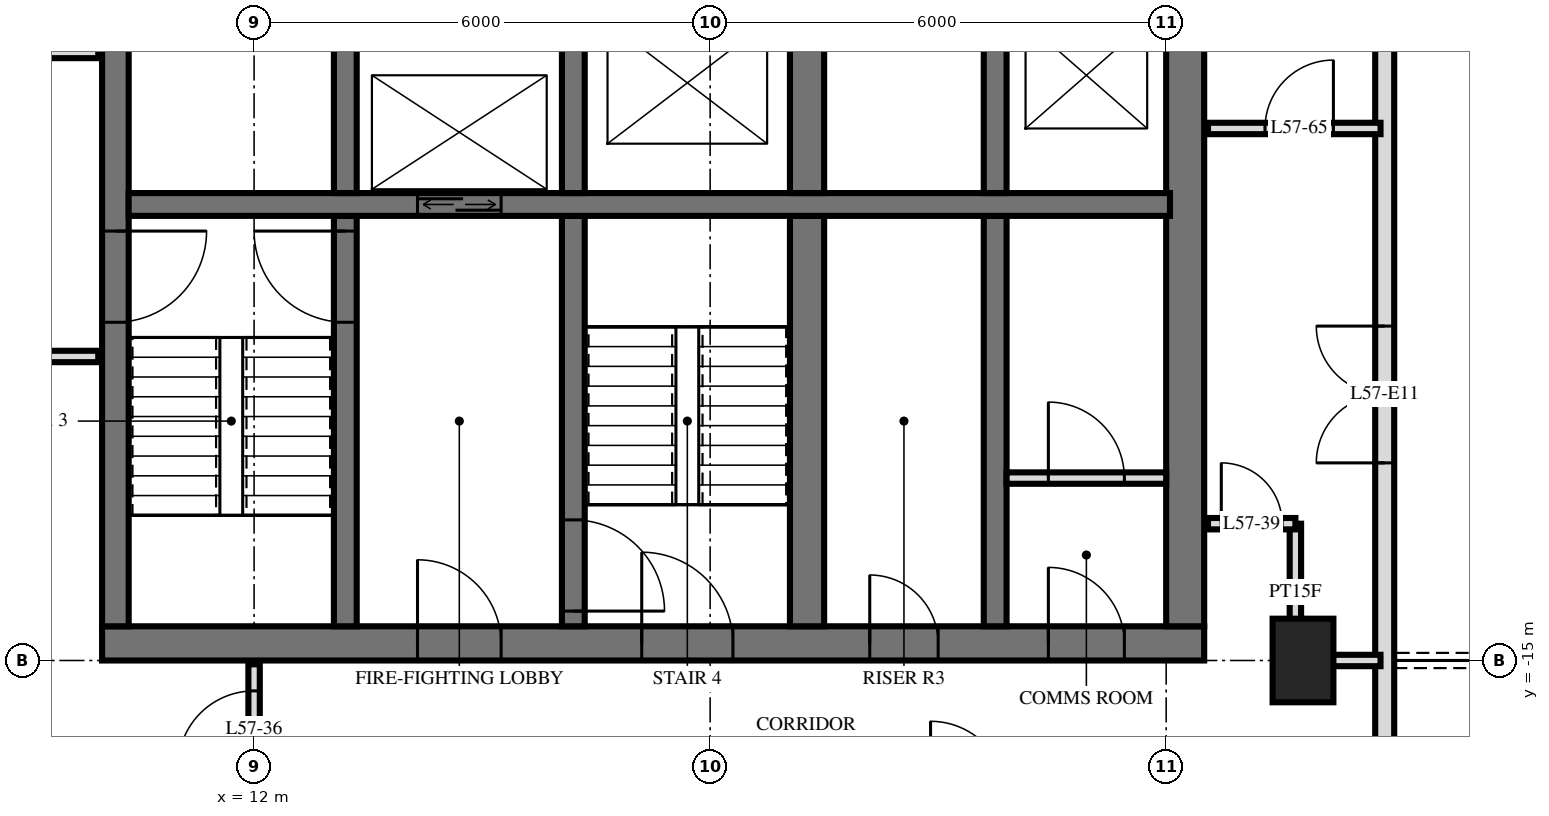
"""IFC4 building model, lengths in metres.
Left out: names, types, materials, properties, quantities, classifications, styles, units other than length and angle.
Written with IfcOpenShell. Run it as: python <this file> out.ifc"""

import sys

from ifc_helpers import new_model, si_unit, direction, frame, frame_2d, origin, origin_2d, place, context, subcontext, project, spatial, rectangle, extrude, element, fill, save


model = new_model("IFC4")
c1 = context("Model", 3, precision=1e-05, world=origin(), true_north=direction((0.0, 1.0)))
c2 = subcontext(c1, "Body", "Model", "MODEL_VIEW")
j1 = project(units=[si_unit("LENGTHUNIT", "METRE"), si_unit("PLANEANGLEUNIT", "RADIAN")], contexts=[c1])
p1 = place(None, origin())
s1 = spatial("IfcSite", under=j1, at=p1, CompositionType="ELEMENT")
p2 = place(p1, origin())
s2 = spatial("IfcBuilding", under=s1, at=p2, CompositionType="ELEMENT")
p3 = place(p2, frame((0.0, 0.0, 218.6)))
s3 = spatial("IfcBuildingStorey", under=s2, at=p3, CompositionType="ELEMENT", Elevation=218.6)
p4 = place(p3, frame((25.8, -15.0, 0.0), z_axis=(0.0, 0.0, 1.0), x_axis=(0.0, 1.0, 0.0)))
e1 = element("IfcColumn", 1, at=p4, inside=s3, PredefinedType="COLUMN", context=c2, shape_type="SweptSolid", body=[
    extrude(rectangle(XDim=1.1, YDim=0.8, at=origin_2d()), origin(), (0.0, 0.0, 1.0), 3.5),
])
p5 = place(p3, frame((10.0, -14.775, 0.0), z_axis=(0.0, 0.0, 1.0), x_axis=(1.0, 0.0, 0.0)))
e2 = element("IfcWall", 2, at=p5, inside=s3, PredefinedType="SHEAR", context=c2, shape_type="SweptSolid", body=[
    extrude(rectangle(XDim=14.5, YDim=0.45, at=frame_2d((7.25, 0.0))), origin(), (0.0, 0.0, 1.0), 3.5),
])
p6 = place(p5, frame((7.1, 0.0, 0.0)))
e3 = element("IfcOpeningElement", 3, at=p6, cuts=e2, PredefinedType="OPENING", context=c2, shape_type="SweptSolid", body=[
    extrude(rectangle(XDim=1.2, YDim=2.1, at=frame_2d((0.6, 1.05))), frame((0.0, 0.235, 0.0), z_axis=(0.0, -1.0, 0.0), x_axis=(1.0, 0.0, 0.0)), (0.0, 0.0, 1.0), 0.47),
])
p7 = place(p5, frame((4.15, 0.0, 0.0)))
e4 = element("IfcOpeningElement", 4, at=p7, cuts=e2, PredefinedType="OPENING", context=c2, shape_type="SweptSolid", body=[
    extrude(rectangle(XDim=1.1, YDim=2.1, at=frame_2d((0.55, 1.05))), frame((0.0, 0.235, 0.0), z_axis=(0.0, -1.0, 0.0), x_axis=(1.0, 0.0, 0.0)), (0.0, 0.0, 1.0), 0.47),
])
p8 = place(p5, frame((10.1, 0.0, 0.0)))
e5 = element("IfcOpeningElement", 5, at=p8, cuts=e2, PredefinedType="OPENING", context=c2, shape_type="SweptSolid", body=[
    extrude(rectangle(XDim=0.9, YDim=2.1, at=frame_2d((0.45, 1.05))), frame((0.0, 0.235, 0.0), z_axis=(0.0, -1.0, 0.0), x_axis=(1.0, 0.0, 0.0)), (0.0, 0.0, 1.0), 0.47),
])
p9 = place(p5, frame((12.45, 0.0, 0.0)))
e6 = element("IfcOpeningElement", 6, at=p9, cuts=e2, PredefinedType="OPENING", context=c2, shape_type="SweptSolid", body=[
    extrude(rectangle(XDim=1.0, YDim=2.1, at=frame_2d((0.5, 1.05))), frame((0.0, 0.235, 0.0), z_axis=(0.0, -1.0, 0.0), x_axis=(1.0, 0.0, 0.0)), (0.0, 0.0, 1.0), 0.47),
])
p10 = place(p3, frame((10.175, -14.55, 0.0), z_axis=(0.0, 0.0, 1.0), x_axis=(0.0, 1.0, 0.0)))
e7 = element("IfcWall", 7, at=p10, inside=s3, PredefinedType="SHEAR", context=c2, shape_type="SweptSolid", body=[
    extrude(rectangle(XDim=14.1, YDim=0.35, at=frame_2d((7.05, 0.0))), origin(), (0.0, 0.0, 1.0), 3.5),
])
p11 = place(p10, frame((8.4, 0.0, 0.0)))
e8 = element("IfcOpeningElement", 8, at=p11, cuts=e7, PredefinedType="OPENING", context=c2, shape_type="SweptSolid", body=[
    extrude(rectangle(XDim=1.4, YDim=2.4, at=frame_2d((0.7, 1.2))), frame((0.0, 0.185, 0.0), z_axis=(0.0, -1.0, 0.0), x_axis=(1.0, 0.0, 0.0)), (0.0, 0.0, 1.0), 0.37),
])
p12 = place(p10, frame((10.0, 0.0, 0.0)))
e9 = element("IfcOpeningElement", 9, at=p12, cuts=e7, PredefinedType="OPENING", context=c2, shape_type="SweptSolid", body=[
    extrude(rectangle(XDim=1.4, YDim=2.4, at=frame_2d((0.7, 1.2))), frame((0.0, 0.185, 0.0), z_axis=(0.0, -1.0, 0.0), x_axis=(1.0, 0.0, 0.0)), (0.0, 0.0, 1.0), 0.37),
])
p13 = place(p10, frame((4.0, 0.0, 0.0)))
e10 = element("IfcOpeningElement", 10, at=p13, cuts=e7, PredefinedType="OPENING", context=c2, shape_type="SweptSolid", body=[
    extrude(rectangle(XDim=1.2, YDim=2.1, at=frame_2d((0.6, 1.05))), frame((0.0, 0.185, 0.0), z_axis=(0.0, -1.0, 0.0), x_axis=(1.0, 0.0, 0.0)), (0.0, 0.0, 1.0), 0.37),
])
p14 = place(p3, frame((24.25, -14.55, 0.0), z_axis=(0.0, 0.0, 1.0), x_axis=(0.0, 1.0, 0.0)))
e11 = element("IfcWall", 11, at=p14, inside=s3, PredefinedType="SHEAR", context=c2, shape_type="SweptSolid", body=[
    extrude(rectangle(XDim=14.1, YDim=0.5, at=frame_2d((7.05, 0.0))), origin(), (0.0, 0.0, 1.0), 3.5),
])
p15 = place(p3, frame((10.35, -9.0, 0.0), z_axis=(0.0, 0.0, 1.0), x_axis=(1.0, 0.0, 0.0)))
e12 = element("IfcWall", 12, at=p15, inside=s3, PredefinedType="SHEAR", context=c2, shape_type="SweptSolid", body=[
    extrude(rectangle(XDim=13.7, YDim=0.3, at=frame_2d((6.85, 0.0))), origin(), (0.0, 0.0, 1.0), 3.5),
])
p16 = place(p15, frame((3.8, 0.0, 0.0)))
e13 = element("IfcOpeningElement", 13, at=p16, cuts=e12, PredefinedType="OPENING", context=c2, shape_type="SweptSolid", body=[
    extrude(rectangle(XDim=1.1, YDim=2.1, at=frame_2d((0.55, 1.05))), frame((0.0, 0.16, 0.0), z_axis=(0.0, -1.0, 0.0), x_axis=(1.0, 0.0, 0.0)), (0.0, 0.0, 1.0), 0.32),
])
p17 = place(p3, frame((13.2, -8.85, 0.0), z_axis=(0.0, 0.0, 1.0), x_axis=(0.0, 1.0, 0.0)))
e14 = element("IfcWall", 14, at=p17, inside=s3, PredefinedType="SHEAR", context=c2, shape_type="SweptSolid", body=[
    extrude(rectangle(XDim=2.3, YDim=0.3, at=frame_2d((1.15, 0.0))), origin(), (0.0, 0.0, 1.0), 3.5),
])
p18 = place(p3, frame((13.2, -14.55, 0.0), z_axis=(0.0, 0.0, 1.0), x_axis=(0.0, 1.0, 0.0)))
e15 = element("IfcWall", 15, at=p18, inside=s3, PredefinedType="SHEAR", context=c2, shape_type="SweptSolid", body=[
    extrude(rectangle(XDim=5.4, YDim=0.3, at=frame_2d((2.7, 0.0))), origin(), (0.0, 0.0, 1.0), 3.5),
])
p19 = place(p18, frame((4.0, 0.0, 0.0)))
e16 = element("IfcOpeningElement", 16, at=p19, cuts=e15, PredefinedType="OPENING", context=c2, shape_type="SweptSolid", body=[
    extrude(rectangle(XDim=1.2, YDim=2.1, at=frame_2d((0.6, 1.05))), frame((0.0, 0.16, 0.0), z_axis=(0.0, -1.0, 0.0), x_axis=(1.0, 0.0, 0.0)), (0.0, 0.0, 1.0), 0.32),
])
p20 = place(p3, frame((16.2, -8.85, 0.0), z_axis=(0.0, 0.0, 1.0), x_axis=(0.0, 1.0, 0.0)))
e17 = element("IfcWall", 17, at=p20, inside=s3, PredefinedType="SHEAR", context=c2, shape_type="SweptSolid", body=[
    extrude(rectangle(XDim=2.3, YDim=0.3, at=frame_2d((1.15, 0.0))), origin(), (0.0, 0.0, 1.0), 3.5),
])
p21 = place(p3, frame((16.2, -14.55, 0.0), z_axis=(0.0, 0.0, 1.0), x_axis=(0.0, 1.0, 0.0)))
e18 = element("IfcWall", 18, at=p21, inside=s3, PredefinedType="SHEAR", context=c2, shape_type="SweptSolid", body=[
    extrude(rectangle(XDim=5.4, YDim=0.3, at=frame_2d((2.7, 0.0))), origin(), (0.0, 0.0, 1.0), 3.5),
])
p22 = place(p21, frame((0.2, 0.0, 0.0)))
e19 = element("IfcOpeningElement", 19, at=p22, cuts=e18, PredefinedType="OPENING", context=c2, shape_type="SweptSolid", body=[
    extrude(rectangle(XDim=1.2, YDim=2.1, at=frame_2d((0.6, 1.05))), frame((0.0, 0.16, 0.0), z_axis=(0.0, -1.0, 0.0), x_axis=(1.0, 0.0, 0.0)), (0.0, 0.0, 1.0), 0.32),
])
p23 = place(p3, frame((19.275, -8.85, 0.0), z_axis=(0.0, 0.0, 1.0), x_axis=(0.0, 1.0, 0.0)))
e20 = element("IfcWall", 20, at=p23, inside=s3, PredefinedType="SHEAR", context=c2, shape_type="SweptSolid", body=[
    extrude(rectangle(XDim=2.3, YDim=0.45, at=frame_2d((1.15, 0.0))), origin(), (0.0, 0.0, 1.0), 3.5),
])
p24 = place(p3, frame((19.275, -14.55, 0.0), z_axis=(0.0, 0.0, 1.0), x_axis=(0.0, 1.0, 0.0)))
e21 = element("IfcWall", 21, at=p24, inside=s3, PredefinedType="SHEAR", context=c2, shape_type="SweptSolid", body=[
    extrude(rectangle(XDim=5.4, YDim=0.45, at=frame_2d((2.7, 0.0))), origin(), (0.0, 0.0, 1.0), 3.5),
])
p25 = place(p3, frame((21.75, -8.85, 0.0), z_axis=(0.0, 0.0, 1.0), x_axis=(0.0, 1.0, 0.0)))
e22 = element("IfcWall", 22, at=p25, inside=s3, PredefinedType="SHEAR", context=c2, shape_type="SweptSolid", body=[
    extrude(rectangle(XDim=2.3, YDim=0.3, at=frame_2d((1.15, 0.0))), origin(), (0.0, 0.0, 1.0), 3.5),
])
p26 = place(p3, frame((21.75, -14.55, 0.0), z_axis=(0.0, 0.0, 1.0), x_axis=(0.0, 1.0, 0.0)))
e23 = element("IfcWall", 23, at=p26, inside=s3, PredefinedType="SHEAR", context=c2, shape_type="SweptSolid", body=[
    extrude(rectangle(XDim=5.4, YDim=0.3, at=frame_2d((2.7, 0.0))), origin(), (0.0, 0.0, 1.0), 3.5),
])
p27 = place(p3, frame((26.875, -24.875, 0.0), z_axis=(0.0, 0.0, 1.0), x_axis=(0.0, 1.0, 0.0)))
e24 = element("IfcWall", 24, at=p27, inside=s3, PredefinedType="SOLIDWALL", context=c2, shape_type="SweptSolid", body=[
    extrude(rectangle(XDim=21.551, YDim=0.25, at=frame_2d((10.775, 0.0))), origin(), (0.0, 0.0, 1.0), 3.22),
])
p28 = place(p27, frame((0.575, 0.0, 0.0)))
e25 = element("IfcOpeningElement", 25, at=p28, cuts=e24, PredefinedType="OPENING", context=c2, shape_type="SweptSolid", body=[
    extrude(rectangle(XDim=1.8, YDim=2.4, at=frame_2d((0.9, 1.2))), frame((0.0, 0.135, 0.0), z_axis=(0.0, -1.0, 0.0), x_axis=(1.0, 0.0, 0.0)), (0.0, 0.0, 1.0), 0.27),
])
p29 = place(p27, frame((5.075, 0.0, 0.0)))
e26 = element("IfcOpeningElement", 26, at=p29, cuts=e24, PredefinedType="OPENING", context=c2, shape_type="SweptSolid", body=[
    extrude(rectangle(XDim=1.8, YDim=2.4, at=frame_2d((0.9, 1.2))), frame((0.0, 0.135, 0.0), z_axis=(0.0, -1.0, 0.0), x_axis=(1.0, 0.0, 0.0)), (0.0, 0.0, 1.0), 0.27),
])
p30 = place(p27, frame((12.475, 0.0, 0.0)))
e27 = element("IfcOpeningElement", 27, at=p30, cuts=e24, PredefinedType="OPENING", context=c2, shape_type="SweptSolid", body=[
    extrude(rectangle(XDim=1.8, YDim=2.4, at=frame_2d((0.9, 1.2))), frame((0.0, 0.135, 0.0), z_axis=(0.0, -1.0, 0.0), x_axis=(1.0, 0.0, 0.0)), (0.0, 0.0, 1.0), 0.27),
])
p31 = place(p3, frame((21.9, -12.6, 0.0), z_axis=(0.0, 0.0, 1.0), x_axis=(1.0, 0.0, 0.0)))
e28 = element("IfcWall", 28, at=p31, inside=s3, PredefinedType="PARTITIONING", context=c2, shape_type="SweptSolid", body=[
    extrude(rectangle(XDim=2.1, YDim=0.15, at=frame_2d((1.05, 0.0))), origin(), (0.0, 0.0, 1.0), 3.2),
])
p32 = place(p31, frame((0.55, 0.0, 0.0)))
e29 = element("IfcOpeningElement", 29, at=p32, cuts=e28, PredefinedType="OPENING", context=c2, shape_type="SweptSolid", body=[
    extrude(rectangle(XDim=1.0, YDim=2.1, at=frame_2d((0.5, 1.05))), frame((0.0, 0.085, 0.0), z_axis=(0.0, -1.0, 0.0), x_axis=(1.0, 0.0, 0.0)), (0.0, 0.0, 1.0), 0.17),
])
p33 = place(p3, frame((25.7, -15.0, 0.0), z_axis=(0.0, 0.0, 1.0), x_axis=(0.0, 1.0, 0.0)))
e30 = element("IfcWall", 30, at=p33, inside=s3, PredefinedType="PARTITIONING", context=c2, shape_type="SweptSolid", body=[
    extrude(rectangle(XDim=1.8, YDim=0.15, at=frame_2d((0.9, 0.0))), origin(), (0.0, 0.0, 1.0), 3.22),
])
p34 = place(p3, frame((12.0, -16.8, 0.0), z_axis=(0.0, 0.0, 1.0), x_axis=(0.0, 1.0, 0.0)))
e31 = element("IfcWall", 31, at=p34, inside=s3, PredefinedType="PARTITIONING", context=c2, shape_type="SweptSolid", body=[
    extrude(rectangle(XDim=1.75, YDim=0.15, at=frame_2d((0.875, 0.0))), origin(), (0.0, 0.0, 1.0), 3.22),
])
p35 = place(p34, frame((0.4, 0.0, 0.0)))
e32 = element("IfcOpeningElement", 32, at=p35, cuts=e31, PredefinedType="OPENING", context=c2, shape_type="SweptSolid", body=[
    extrude(rectangle(XDim=1.0, YDim=2.1, at=frame_2d((0.5, 1.05))), frame((0.0, 0.085, 0.0), z_axis=(0.0, -1.0, 0.0), x_axis=(1.0, 0.0, 0.0)), (0.0, 0.0, 1.0), 0.17),
])
p36 = place(p3, frame((25.7, -15.0, 0.0), z_axis=(0.0, 0.0, 1.0), x_axis=(1.0, 0.0, 0.0)))
e33 = element("IfcWall", 33, at=p36, inside=s3, PredefinedType="PARTITIONING", context=c2, shape_type="SweptSolid", body=[
    extrude(rectangle(XDim=1.12, YDim=0.15, at=frame_2d((0.56, 0.0))), origin(), (0.0, 0.0, 1.0), 3.22),
])
p37 = place(p3, frame((24.55, -13.2, 0.0), z_axis=(0.0, 0.0, 1.0), x_axis=(1.0, 0.0, 0.0)))
e34 = element("IfcWall", 34, at=p37, inside=s3, PredefinedType="PARTITIONING", context=c2, shape_type="SweptSolid", body=[
    extrude(rectangle(XDim=1.15, YDim=0.15, at=frame_2d((0.575, 0.0))), origin(), (0.0, 0.0, 1.0), 3.22),
])
p38 = place(p37, frame((0.175, 0.0, 0.0)))
e35 = element("IfcOpeningElement", 35, at=p38, cuts=e34, PredefinedType="OPENING", context=c2, shape_type="SweptSolid", body=[
    extrude(rectangle(XDim=0.8, YDim=2.1, at=frame_2d((0.4, 1.05))), frame((0.0, 0.085, 0.0), z_axis=(0.0, -1.0, 0.0), x_axis=(1.0, 0.0, 0.0)), (0.0, 0.0, 1.0), 0.17),
])
p39 = place(p3, frame((-9.95, -11.0, 0.0), z_axis=(0.0, 0.0, 1.0), x_axis=(1.0, 0.0, 0.0)))
e36 = element("IfcWall", 36, at=p39, inside=s3, PredefinedType="PARTITIONING", context=c2, shape_type="SweptSolid", body=[
    extrude(rectangle(XDim=19.9, YDim=0.15, at=frame_2d((9.95, 0.0))), origin(), (0.0, 0.0, 1.0), 3.22),
])
p40 = place(p39, frame((9.45, 0.0, 0.0)))
e37 = element("IfcOpeningElement", 37, at=p40, cuts=e36, PredefinedType="OPENING", context=c2, shape_type="SweptSolid", body=[
    extrude(rectangle(XDim=1.0, YDim=2.1, at=frame_2d((0.5, 1.05))), frame((0.0, 0.085, 0.0), z_axis=(0.0, -1.0, 0.0), x_axis=(1.0, 0.0, 0.0)), (0.0, 0.0, 1.0), 0.17),
])
p41 = place(p39, frame((3.45, 0.0, 0.0)))
e38 = element("IfcOpeningElement", 38, at=p41, cuts=e36, PredefinedType="OPENING", context=c2, shape_type="SweptSolid", body=[
    extrude(rectangle(XDim=1.0, YDim=2.1, at=frame_2d((0.5, 1.05))), frame((0.0, 0.085, 0.0), z_axis=(0.0, -1.0, 0.0), x_axis=(1.0, 0.0, 0.0)), (0.0, 0.0, 1.0), 0.17),
])
p42 = place(p3, frame((24.55, -8.0, 0.0), z_axis=(0.0, 0.0, 1.0), x_axis=(1.0, 0.0, 0.0)))
e39 = element("IfcWall", 39, at=p42, inside=s3, PredefinedType="PARTITIONING", context=c2, shape_type="SweptSolid", body=[
    extrude(rectangle(XDim=2.27, YDim=0.15, at=frame_2d((1.135, 0.0))), origin(), (0.0, 0.0, 1.0), 3.22),
])
p43 = place(p42, frame((0.75, 0.0, 0.0)))
e40 = element("IfcOpeningElement", 40, at=p43, cuts=e39, PredefinedType="OPENING", context=c2, shape_type="SweptSolid", body=[
    extrude(rectangle(XDim=0.9, YDim=2.1, at=frame_2d((0.45, 1.05))), frame((0.0, 0.085, 0.0), z_axis=(0.0, -1.0, 0.0), x_axis=(1.0, 0.0, 0.0)), (0.0, 0.0, 1.0), 0.17),
])
p44 = place(p3, frame((-9.95, -7.0, 0.0), z_axis=(0.0, 0.0, 1.0), x_axis=(1.0, 0.0, 0.0)))
e41 = element("IfcWall", 41, at=p44, inside=s3, PredefinedType="PARTITIONING", context=c2, shape_type="SweptSolid", body=[
    extrude(rectangle(XDim=19.9, YDim=0.15, at=frame_2d((9.95, 0.0))), origin(), (0.0, 0.0, 1.0), 3.22),
])
p45 = place(p44, frame((9.45, 0.0, 0.0)))
e42 = element("IfcOpeningElement", 42, at=p45, cuts=e41, PredefinedType="OPENING", context=c2, shape_type="SweptSolid", body=[
    extrude(rectangle(XDim=1.0, YDim=2.1, at=frame_2d((0.5, 1.05))), frame((0.0, 0.085, 0.0), z_axis=(0.0, -1.0, 0.0), x_axis=(1.0, 0.0, 0.0)), (0.0, 0.0, 1.0), 0.17),
])
p46 = place(p44, frame((15.45, 0.0, 0.0)))
e43 = element("IfcOpeningElement", 43, at=p46, cuts=e41, PredefinedType="OPENING", context=c2, shape_type="SweptSolid", body=[
    extrude(rectangle(XDim=1.0, YDim=2.1, at=frame_2d((0.5, 1.05))), frame((0.0, 0.085, 0.0), z_axis=(0.0, -1.0, 0.0), x_axis=(1.0, 0.0, 0.0)), (0.0, 0.0, 1.0), 0.17),
])
p47 = place(p30, origin())
e44 = element("IfcDoor", 44, at=p47, inside=s3, OperationType="DOUBLE_DOOR_SINGLE_SWING", PredefinedType="DOOR", context=c2, shape_type="SweptSolid", body=[
    extrude(rectangle(XDim=1.8, YDim=2.4, at=frame_2d((0.9, 1.2))), frame((0.0, 0.025, 0.0), z_axis=(0.0, -1.0, 0.0), x_axis=(1.0, 0.0, 0.0)), (0.0, 0.0, 1.0), 0.05),
])
fill(e27, e44)
p48 = place(p16, origin())
e45 = element("IfcDoor", 45, at=p48, inside=s3, OperationType="DOUBLE_DOOR_SLIDING", PredefinedType="USERDEFINED", context=c2, shape_type="SweptSolid", body=[
    extrude(rectangle(XDim=1.1, YDim=2.1, at=frame_2d((0.55, 1.05))), frame((0.0, 0.025, 0.0), z_axis=(0.0, -1.0, 0.0), x_axis=(1.0, 0.0, 0.0)), (0.0, 0.0, 1.0), 0.05),
])
fill(e13, e45)
p49 = place(p13, frame((0.6, 0.0, 0.0), z_axis=(0.0, 0.0, 1.0), x_axis=(-1.0, 0.0, 0.0)))
e46 = element("IfcDoor", 46, at=p49, inside=s3, OperationType="SINGLE_SWING_RIGHT", PredefinedType="DOOR", context=c2, shape_type="SweptSolid", body=[
    extrude(rectangle(XDim=1.2, YDim=2.1, at=frame_2d((0.0, 1.05))), frame((0.0, -0.025, 0.0), z_axis=(0.0, 1.0, 0.0), x_axis=(-1.0, 0.0, 0.0)), (0.0, 0.0, 1.0), 0.05),
])
fill(e10, e46)
p50 = place(p6, origin())
e47 = element("IfcDoor", 47, at=p50, inside=s3, OperationType="SINGLE_SWING_RIGHT", PredefinedType="DOOR", context=c2, shape_type="SweptSolid", body=[
    extrude(rectangle(XDim=1.2, YDim=2.1, at=frame_2d((0.6, 1.05))), frame((0.0, 0.025, 0.0), z_axis=(0.0, -1.0, 0.0), x_axis=(1.0, 0.0, 0.0)), (0.0, 0.0, 1.0), 0.05),
])
fill(e3, e47)
p51 = place(p7, origin())
e48 = element("IfcDoor", 48, at=p51, inside=s3, OperationType="SINGLE_SWING_RIGHT", PredefinedType="DOOR", context=c2, shape_type="SweptSolid", body=[
    extrude(rectangle(XDim=1.1, YDim=2.1, at=frame_2d((0.55, 1.05))), frame((0.0, 0.025, 0.0), z_axis=(0.0, -1.0, 0.0), x_axis=(1.0, 0.0, 0.0)), (0.0, 0.0, 1.0), 0.05),
])
fill(e4, e48)
p52 = place(p8, origin())
e49 = element("IfcDoor", 49, at=p52, inside=s3, OperationType="SINGLE_SWING_RIGHT", PredefinedType="DOOR", context=c2, shape_type="SweptSolid", body=[
    extrude(rectangle(XDim=0.9, YDim=2.1, at=frame_2d((0.45, 1.05))), frame((0.0, 0.025, 0.0), z_axis=(0.0, -1.0, 0.0), x_axis=(1.0, 0.0, 0.0)), (0.0, 0.0, 1.0), 0.05),
])
fill(e5, e49)
p53 = place(p9, origin())
e50 = element("IfcDoor", 50, at=p53, inside=s3, OperationType="SINGLE_SWING_RIGHT", PredefinedType="DOOR", context=c2, shape_type="SweptSolid", body=[
    extrude(rectangle(XDim=1.0, YDim=2.1, at=frame_2d((0.5, 1.05))), frame((0.0, 0.025, 0.0), z_axis=(0.0, -1.0, 0.0), x_axis=(1.0, 0.0, 0.0)), (0.0, 0.0, 1.0), 0.05),
])
fill(e6, e50)
p54 = place(p19, origin())
e51 = element("IfcDoor", 51, at=p54, inside=s3, OperationType="SINGLE_SWING_LEFT", PredefinedType="DOOR", context=c2, shape_type="SweptSolid", body=[
    extrude(rectangle(XDim=1.2, YDim=2.1, at=frame_2d((0.6, 1.05))), frame((0.0, 0.025, 0.0), z_axis=(0.0, -1.0, 0.0), x_axis=(1.0, 0.0, 0.0)), (0.0, 0.0, 1.0), 0.05),
])
fill(e16, e51)
p55 = place(p22, frame((0.6, 0.0, 0.0), z_axis=(0.0, 0.0, 1.0), x_axis=(-1.0, 0.0, 0.0)))
e52 = element("IfcDoor", 52, at=p55, inside=s3, OperationType="SINGLE_SWING_LEFT", PredefinedType="DOOR", context=c2, shape_type="SweptSolid", body=[
    extrude(rectangle(XDim=1.2, YDim=2.1, at=frame_2d((0.0, 1.05))), frame((0.0, -0.025, 0.0), z_axis=(0.0, 1.0, 0.0), x_axis=(-1.0, 0.0, 0.0)), (0.0, 0.0, 1.0), 0.05),
])
fill(e19, e52)
p56 = place(p32, origin())
e53 = element("IfcDoor", 53, at=p56, inside=s3, OperationType="SINGLE_SWING_RIGHT", PredefinedType="DOOR", context=c2, shape_type="SweptSolid", body=[
    extrude(rectangle(XDim=1.0, YDim=2.1, at=frame_2d((0.5, 1.05))), frame((0.0, 0.025, 0.0), z_axis=(0.0, -1.0, 0.0), x_axis=(1.0, 0.0, 0.0)), (0.0, 0.0, 1.0), 0.05),
])
fill(e29, e53)
p57 = place(p35, origin())
e54 = element("IfcDoor", 54, at=p57, inside=s3, OperationType="SINGLE_SWING_RIGHT", PredefinedType="DOOR", context=c2, shape_type="SweptSolid", body=[
    extrude(rectangle(XDim=1.0, YDim=2.1, at=frame_2d((0.5, 1.05))), frame((0.0, 0.025, 0.0), z_axis=(0.0, -1.0, 0.0), x_axis=(1.0, 0.0, 0.0)), (0.0, 0.0, 1.0), 0.05),
])
fill(e32, e54)
p58 = place(p38, origin())
e55 = element("IfcDoor", 55, at=p58, inside=s3, OperationType="SINGLE_SWING_RIGHT", PredefinedType="DOOR", context=c2, shape_type="SweptSolid", body=[
    extrude(rectangle(XDim=0.8, YDim=2.1, at=frame_2d((0.4, 1.05))), frame((0.0, 0.025, 0.0), z_axis=(0.0, -1.0, 0.0), x_axis=(1.0, 0.0, 0.0)), (0.0, 0.0, 1.0), 0.05),
])
fill(e35, e55)
p59 = place(p43, origin())
e56 = element("IfcDoor", 56, at=p59, inside=s3, OperationType="SINGLE_SWING_LEFT", PredefinedType="DOOR", context=c2, shape_type="SweptSolid", body=[
    extrude(rectangle(XDim=0.9, YDim=2.1, at=frame_2d((0.45, 1.05))), frame((0.0, 0.025, 0.0), z_axis=(0.0, -1.0, 0.0), x_axis=(1.0, 0.0, 0.0)), (0.0, 0.0, 1.0), 0.05),
])
fill(e40, e56)
save(model, sys.argv[1])
